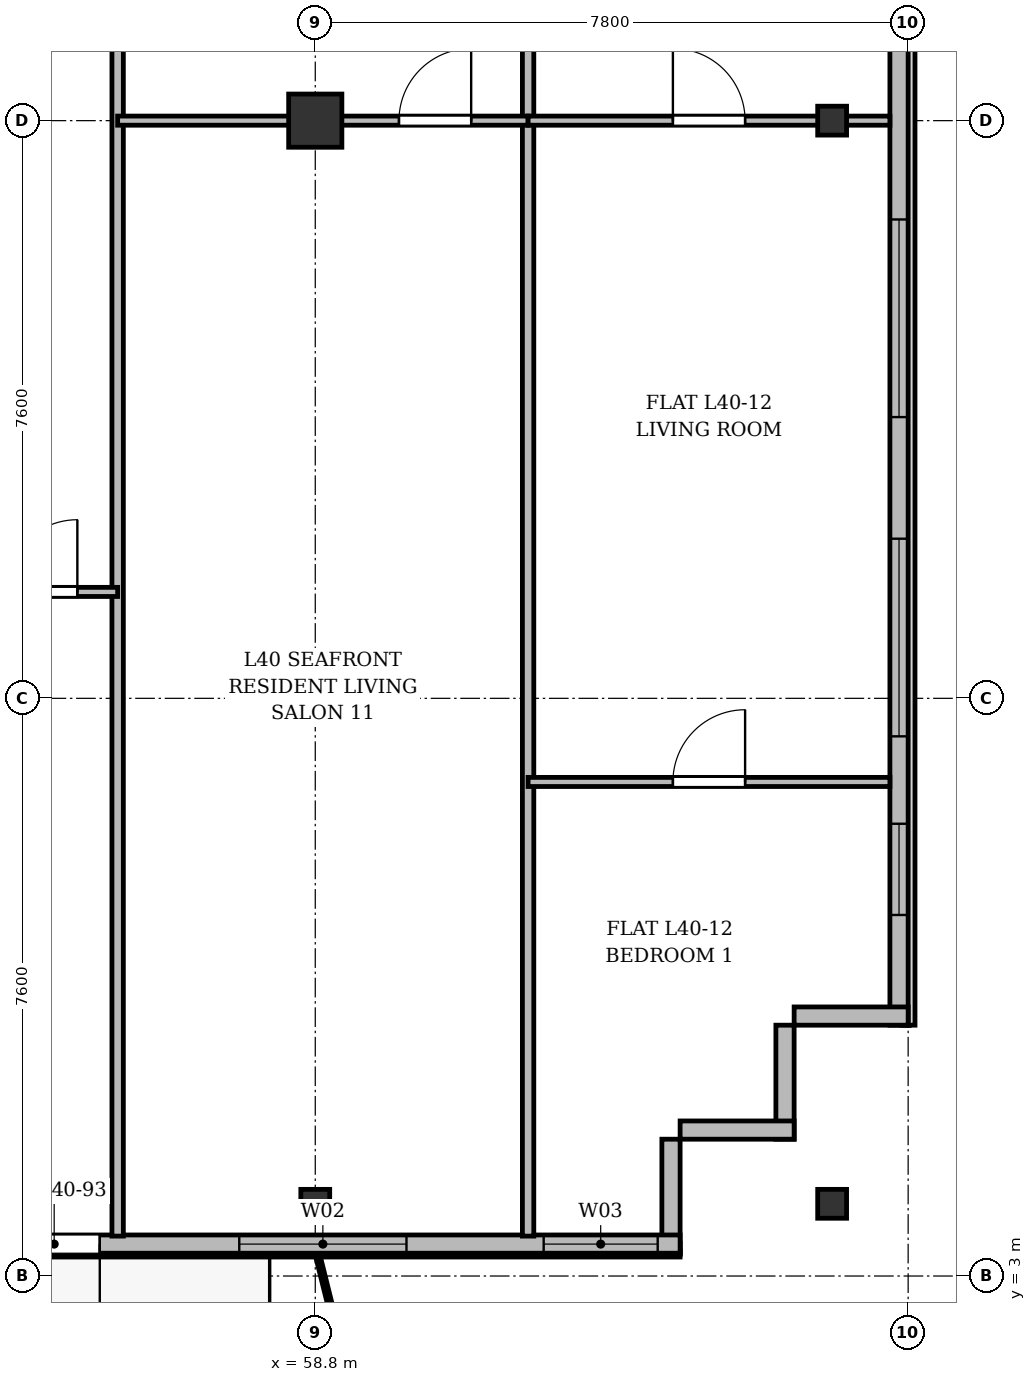
"""IFC4 building model, lengths in metres.
Left out: names, types, materials, properties, quantities, classifications, styles, units other than length and angle.
Written with IfcOpenShell. Run it as: python <this file> out.ifc"""

import sys

from ifc_helpers import new_model, si_unit, direction, frame, frame_2d, origin, origin_2d, place, context, subcontext, project, spatial, rectangle, i_section, extrude, source, transform, mapped, element, fill, save


model = new_model("IFC4")
c1 = context("Model", 3, precision=1e-05, world=origin(), true_north=direction((0.0, 1.0)))
c2 = subcontext(c1, "Body", "Model", "MODEL_VIEW")
j1 = project(units=[si_unit("LENGTHUNIT", "METRE"), si_unit("PLANEANGLEUNIT", "RADIAN")], contexts=[c1])
p1 = place(None, origin())
s1 = spatial("IfcSite", under=j1, at=p1, CompositionType="ELEMENT")
p2 = place(p1, origin())
s2 = spatial("IfcBuilding", under=s1, at=p2, CompositionType="ELEMENT")
p3 = place(p2, frame((0.0, 0.0, 153.7)))
s3 = spatial("IfcBuildingStorey", under=s2, at=p3, CompositionType="ELEMENT", Elevation=153.7)
m1 = source(origin(), c2, "Body", "SweptSolid", [
    extrude(i_section(OverallWidth=0.38, OverallDepth=0.38, WebThickness=0.02, FlangeThickness=0.03, at=origin_2d()), origin(), (0.0, 0.0, 1.0), 3.6),
])
p4 = place(p3, frame((58.8, 3.95, 0.0), z_axis=(0.0, 0.0, 1.0), x_axis=(1.0, 0.0, 0.0)))
e1 = element("IfcColumn", 1, at=p4, inside=s3, PredefinedType="COLUMN", context=c2, shape_type="MappedRepresentation", body=[
    mapped(m1, transform((0.0, 0.0, 0.0), x_axis=(1.0, 0.0, 0.0), y_axis=(0.0, 1.0, 0.0), z_axis=(0.0, 0.0, 1.0), scale=1.0)),
])
m2 = source(origin(), c2, "Body", "SweptSolid", [
    extrude(rectangle(XDim=0.7, YDim=0.7, at=origin_2d()), origin(), (0.0, 0.0, 1.0), 3.6),
])
p5 = place(p3, frame((58.8, 18.2, 0.0), z_axis=(0.0, 0.0, 1.0), x_axis=(1.0, 0.0, 0.0)))
e2 = element("IfcColumn", 2, at=p5, inside=s3, PredefinedType="COLUMN", context=c2, shape_type="MappedRepresentation", body=[
    mapped(m2, transform((0.0, 0.0, 0.0), x_axis=(1.0, 0.0, 0.0), y_axis=(0.0, 1.0, 0.0), z_axis=(0.0, 0.0, 1.0), scale=1.0)),
])
for number, where, z_axis, x_axis in (
    (3, (65.6, 3.95, 0.0), (0.0, 0.0, 1.0), (1.0, 0.0, 0.0)),
    (4, (65.6, 18.2, 0.0), (0.0, 0.0, 1.0), (1.0, 0.0, 0.0)),
):
    element("IfcColumn", number, at=place(p3, frame(where, z_axis=z_axis, x_axis=x_axis)), inside=s3, PredefinedType="COLUMN", context=c2, shape_type="MappedRepresentation", body=[
        mapped(m1, transform((0.0, 0.0, 0.0), x_axis=(1.0, 0.0, 0.0), y_axis=(0.0, 1.0, 0.0), z_axis=(0.0, 0.0, 1.0), scale=1.0)),
    ])
p6 = place(p3, frame((66.48, 45.5, 0.0), z_axis=(0.0, 0.0, 1.0), x_axis=(0.0, -1.0, 0.0)))
e5 = element("IfcWall", 5, at=p6, inside=s3, PredefinedType="SOLIDWALL", context=c2, shape_type="SweptSolid", body=[
    extrude(rectangle(XDim=39.2, YDim=0.24, at=frame_2d((19.6, 0.0))), origin(), (0.0, 0.0, 1.0), 3.35),
])
p7 = place(p6, frame((36.55, 0.0, 0.92)))
e6 = element("IfcOpeningElement", 6, at=p7, cuts=e5, PredefinedType="OPENING", context=c2, shape_type="SweptSolid", body=[
    extrude(rectangle(XDim=1.2, YDim=1.65, at=frame_2d((0.6, 0.825))), frame((0.0, 0.13, 0.0), z_axis=(0.0, -1.0, 0.0), x_axis=(1.0, 0.0, 0.0)), (0.0, 0.0, 1.0), 0.26),
])
p8 = place(p6, frame((32.8, 0.0, 0.92)))
e7 = element("IfcOpeningElement", 7, at=p8, cuts=e5, PredefinedType="OPENING", context=c2, shape_type="SweptSolid", body=[
    extrude(rectangle(XDim=2.6, YDim=1.9, at=frame_2d((1.3, 0.95))), frame((0.0, 0.13, 0.0), z_axis=(0.0, -1.0, 0.0), x_axis=(1.0, 0.0, 0.0)), (0.0, 0.0, 1.0), 0.26),
])
p9 = place(p6, frame((28.6, 0.0, 0.92)))
e8 = element("IfcOpeningElement", 8, at=p9, cuts=e5, PredefinedType="OPENING", context=c2, shape_type="SweptSolid", body=[
    extrude(rectangle(XDim=2.6, YDim=1.9, at=frame_2d((1.3, 0.95))), frame((0.0, 0.13, 0.0), z_axis=(0.0, -1.0, 0.0), x_axis=(1.0, 0.0, 0.0)), (0.0, 0.0, 1.0), 0.26),
])
p10 = place(p6, frame((21.4, 0.0, 0.92)))
e9 = element("IfcOpeningElement", 9, at=p10, cuts=e5, PredefinedType="OPENING", context=c2, shape_type="SweptSolid", body=[
    extrude(rectangle(XDim=2.6, YDim=1.9, at=frame_2d((1.3, 0.95))), frame((0.0, 0.13, 0.0), z_axis=(0.0, -1.0, 0.0), x_axis=(1.0, 0.0, 0.0)), (0.0, 0.0, 1.0), 0.26),
])
p11 = place(p6, frame((7.4, 0.0, 0.92)))
e10 = element("IfcOpeningElement", 10, at=p11, cuts=e5, PredefinedType="OPENING", context=c2, shape_type="SweptSolid", body=[
    extrude(rectangle(XDim=2.6, YDim=1.9, at=frame_2d((1.3, 0.95))), frame((0.0, 0.13, 0.0), z_axis=(0.0, -1.0, 0.0), x_axis=(1.0, 0.0, 0.0)), (0.0, 0.0, 1.0), 0.26),
])
p12 = place(p6, frame((4.5, 0.0, 0.92)))
e11 = element("IfcOpeningElement", 11, at=p12, cuts=e5, PredefinedType="OPENING", context=c2, shape_type="SweptSolid", body=[
    extrude(rectangle(XDim=1.2, YDim=1.65, at=frame_2d((0.6, 0.825))), frame((0.0, 0.13, 0.0), z_axis=(0.0, -1.0, 0.0), x_axis=(1.0, 0.0, 0.0)), (0.0, 0.0, 1.0), 0.26),
])
p13 = place(p6, frame((1.15, 0.0, 0.92)))
e12 = element("IfcOpeningElement", 12, at=p13, cuts=e5, PredefinedType="OPENING", context=c2, shape_type="SweptSolid", body=[
    extrude(rectangle(XDim=1.2, YDim=1.65, at=frame_2d((0.6, 0.825))), frame((0.0, 0.13, 0.0), z_axis=(0.0, -1.0, 0.0), x_axis=(1.0, 0.0, 0.0)), (0.0, 0.0, 1.0), 0.26),
])
p14 = place(p3, frame((66.6, 6.42, 0.0), z_axis=(0.0, 0.0, 1.0), x_axis=(-1.0, 0.0, 0.0)))
e13 = element("IfcWall", 13, at=p14, inside=s3, PredefinedType="SOLIDWALL", context=c2, shape_type="SweptSolid", body=[
    extrude(rectangle(XDim=1.5, YDim=0.24, at=frame_2d((0.75, 0.0))), origin(), (0.0, 0.0, 1.0), 2.85),
])
for number, where, z_axis, x_axis in (
    (14, (64.98, 6.3, 0.0), (0.0, 0.0, 1.0), (0.0, -1.0, 0.0)),
    (15, (65.1, 4.92, 0.0), (0.0, 0.0, 1.0), (-1.0, 0.0, 0.0)),
):
    element("IfcWall", number, at=place(p3, frame(where, z_axis=z_axis, x_axis=x_axis)), inside=s3, PredefinedType="SOLIDWALL", context=c2, shape_type="SweptSolid", body=[
        extrude(rectangle(XDim=1.5, YDim=0.24, at=frame_2d((0.75, 0.0))), origin(), (0.0, 0.0, 1.0), 3.35),
    ])
p15 = place(p3, frame((63.48, 4.8, 0.0), z_axis=(0.0, 0.0, 1.0), x_axis=(0.0, -1.0, 0.0)))
e16 = element("IfcWall", 16, at=p15, inside=s3, PredefinedType="SOLIDWALL", context=c2, shape_type="SweptSolid", body=[
    extrude(rectangle(XDim=1.5, YDim=0.24, at=frame_2d((0.75, 0.0))), origin(), (0.0, 0.0, 1.0), 2.75),
])
p16 = place(p3, frame((63.6, 3.42, 0.0), z_axis=(0.0, 0.0, 1.0), x_axis=(-1.0, 0.0, 0.0)))
e17 = element("IfcWall", 17, at=p16, inside=s3, PredefinedType="SOLIDWALL", context=c2, shape_type="SweptSolid", body=[
    extrude(rectangle(XDim=52.8, YDim=0.24, at=frame_2d((26.4, 0.0))), origin(), (0.0, 0.0, 1.0), 3.35),
])
p17 = place(p16, frame((0.295, 0.0, 0.9)))
e18 = element("IfcOpeningElement", 18, at=p17, cuts=e17, PredefinedType="OPENING", context=c2, shape_type="SweptSolid", body=[
    extrude(rectangle(XDim=1.5, YDim=1.75, at=frame_2d((0.75, 0.875))), frame((0.0, 0.13, 0.0), z_axis=(0.0, -1.0, 0.0), x_axis=(1.0, 0.0, 0.0)), (0.0, 0.0, 1.0), 0.26),
])
p18 = place(p16, frame((3.6, 0.0, 0.9)))
e19 = element("IfcOpeningElement", 19, at=p18, cuts=e17, PredefinedType="OPENING", context=c2, shape_type="SweptSolid", body=[
    extrude(rectangle(XDim=2.2, YDim=1.8, at=frame_2d((1.1, 0.9))), frame((0.0, 0.13, 0.0), z_axis=(0.0, -1.0, 0.0), x_axis=(1.0, 0.0, 0.0)), (0.0, 0.0, 1.0), 0.26),
])
p19 = place(p16, frame((7.635, 0.0, 0.0)))
e20 = element("IfcOpeningElement", 20, at=p19, cuts=e17, PredefinedType="OPENING", context=c2, shape_type="SweptSolid", body=[
    extrude(rectangle(XDim=1.2, YDim=2.2, at=frame_2d((0.6, 1.1))), frame((0.0, 0.13, 0.0), z_axis=(0.0, -1.0, 0.0), x_axis=(1.0, 0.0, 0.0)), (0.0, 0.0, 1.0), 0.26),
])
p20 = place(p16, frame((9.6, 0.0, 0.9)))
e21 = element("IfcOpeningElement", 21, at=p20, cuts=e17, PredefinedType="OPENING", context=c2, shape_type="SweptSolid", body=[
    extrude(rectangle(XDim=2.0, YDim=1.95, at=frame_2d((1.0, 0.975))), frame((0.0, 0.13, 0.0), z_axis=(0.0, -1.0, 0.0), x_axis=(1.0, 0.0, 0.0)), (0.0, 0.0, 1.0), 0.26),
])
p21 = place(p16, frame((12.175, 0.0, 0.9)))
e22 = element("IfcOpeningElement", 22, at=p21, cuts=e17, PredefinedType="OPENING", context=c2, shape_type="SweptSolid", body=[
    extrude(rectangle(XDim=1.65, YDim=1.85, at=frame_2d((0.825, 0.925))), frame((0.0, 0.13, 0.0), z_axis=(0.0, -1.0, 0.0), x_axis=(1.0, 0.0, 0.0)), (0.0, 0.0, 1.0), 0.26),
])
p22 = place(p16, frame((16.1, 0.0, 0.9)))
e23 = element("IfcOpeningElement", 23, at=p22, cuts=e17, PredefinedType="OPENING", context=c2, shape_type="SweptSolid", body=[
    extrude(rectangle(XDim=1.8, YDim=1.8, at=frame_2d((0.9, 0.9))), frame((0.0, 0.13, 0.0), z_axis=(0.0, -1.0, 0.0), x_axis=(1.0, 0.0, 0.0)), (0.0, 0.0, 1.0), 0.26),
])
p23 = place(p16, frame((22.3, 0.0, 0.9)))
e24 = element("IfcOpeningElement", 24, at=p23, cuts=e17, PredefinedType="OPENING", context=c2, shape_type="SweptSolid", body=[
    extrude(rectangle(XDim=2.2, YDim=1.8, at=frame_2d((1.1, 0.9))), frame((0.0, 0.13, 0.0), z_axis=(0.0, -1.0, 0.0), x_axis=(1.0, 0.0, 0.0)), (0.0, 0.0, 1.0), 0.26),
])
p24 = place(p16, frame((27.75, 0.0, 0.9)))
e25 = element("IfcOpeningElement", 25, at=p24, cuts=e17, PredefinedType="OPENING", context=c2, shape_type="SweptSolid", body=[
    extrude(rectangle(XDim=1.5, YDim=1.75, at=frame_2d((0.75, 0.875))), frame((0.0, 0.13, 0.0), z_axis=(0.0, -1.0, 0.0), x_axis=(1.0, 0.0, 0.0)), (0.0, 0.0, 1.0), 0.26),
])
p25 = place(p16, frame((30.5, 0.0, 0.9)))
e26 = element("IfcOpeningElement", 26, at=p25, cuts=e17, PredefinedType="OPENING", context=c2, shape_type="SweptSolid", body=[
    extrude(rectangle(XDim=2.0, YDim=1.95, at=frame_2d((1.0, 0.975))), frame((0.0, 0.13, 0.0), z_axis=(0.0, -1.0, 0.0), x_axis=(1.0, 0.0, 0.0)), (0.0, 0.0, 1.0), 0.26),
])
p26 = place(p16, frame((34.375, 0.0, 0.9)))
e27 = element("IfcOpeningElement", 27, at=p26, cuts=e17, PredefinedType="OPENING", context=c2, shape_type="SweptSolid", body=[
    extrude(rectangle(XDim=1.65, YDim=1.85, at=frame_2d((0.825, 0.925))), frame((0.0, 0.13, 0.0), z_axis=(0.0, -1.0, 0.0), x_axis=(1.0, 0.0, 0.0)), (0.0, 0.0, 1.0), 0.26),
])
p27 = place(p16, frame((39.5, 0.0, 0.9)))
e28 = element("IfcOpeningElement", 28, at=p27, cuts=e17, PredefinedType="OPENING", context=c2, shape_type="SweptSolid", body=[
    extrude(rectangle(XDim=1.8, YDim=1.8, at=frame_2d((0.9, 0.9))), frame((0.0, 0.13, 0.0), z_axis=(0.0, -1.0, 0.0), x_axis=(1.0, 0.0, 0.0)), (0.0, 0.0, 1.0), 0.26),
])
p28 = place(p16, frame((43.65, 0.0, 0.9)))
e29 = element("IfcOpeningElement", 29, at=p28, cuts=e17, PredefinedType="OPENING", context=c2, shape_type="SweptSolid", body=[
    extrude(rectangle(XDim=1.5, YDim=1.75, at=frame_2d((0.75, 0.875))), frame((0.0, 0.13, 0.0), z_axis=(0.0, -1.0, 0.0), x_axis=(1.0, 0.0, 0.0)), (0.0, 0.0, 1.0), 0.26),
])
p29 = place(p16, frame((47.35, 0.0, 0.9)))
e30 = element("IfcOpeningElement", 30, at=p29, cuts=e17, PredefinedType="OPENING", context=c2, shape_type="SweptSolid", body=[
    extrude(rectangle(XDim=1.5, YDim=1.75, at=frame_2d((0.75, 0.875))), frame((0.0, 0.13, 0.0), z_axis=(0.0, -1.0, 0.0), x_axis=(1.0, 0.0, 0.0)), (0.0, 0.0, 1.0), 0.26),
])
p30 = place(p16, frame((51.005, 0.0, 0.9)))
e31 = element("IfcOpeningElement", 31, at=p30, cuts=e17, PredefinedType="OPENING", context=c2, shape_type="SweptSolid", body=[
    extrude(rectangle(XDim=1.5, YDim=1.75, at=frame_2d((0.75, 0.875))), frame((0.0, 0.13, 0.0), z_axis=(0.0, -1.0, 0.0), x_axis=(1.0, 0.0, 0.0)), (0.0, 0.0, 1.0), 0.26),
])
p31 = place(p16, frame((37.85, 0.0, 0.0)))
e32 = element("IfcOpeningElement", 32, at=p31, cuts=e17, PredefinedType="OPENING", context=c2, shape_type="SweptSolid", body=[
    extrude(rectangle(XDim=1.2, YDim=2.2, at=frame_2d((0.6, 1.1))), frame((0.0, 0.13, 0.0), z_axis=(0.0, -1.0, 0.0), x_axis=(1.0, 0.0, 0.0)), (0.0, 0.0, 1.0), 0.26),
])
for number, where, z_axis, x_axis in (
    (33, (61.6, 3.525, 0.0), (0.0, 0.0, 1.0), (0.0, 1.0, 0.0)),
    (34, (56.2, 3.525, 0.0), (0.0, 0.0, 1.0), (0.0, 1.0, 0.0)),
):
    element("IfcWall", number, at=place(p3, frame(where, z_axis=z_axis, x_axis=x_axis)), inside=s3, PredefinedType="PARTITIONING", context=c2, shape_type="SweptSolid", body=[
        extrude(rectangle(XDim=27.275, YDim=0.15, at=frame_2d((13.638, 0.0))), origin(), (0.0, 0.0, 1.0), 2.75),
    ])
p32 = place(p3, frame((54.2, 12.0, 0.0), z_axis=(0.0, 0.0, 1.0), x_axis=(1.0, 0.0, 0.0)))
e35 = element("IfcWall", 35, at=p32, inside=s3, PredefinedType="PARTITIONING", context=c2, shape_type="SweptSolid", body=[
    extrude(rectangle(XDim=2.0, YDim=0.12, at=frame_2d((1.0, 0.0))), origin(), (0.0, 0.0, 1.0), 3.35),
])
p33 = place(p32, frame((0.52, 0.0, 0.0)))
e36 = element("IfcOpeningElement", 36, at=p33, cuts=e35, PredefinedType="OPENING", context=c2, shape_type="SweptSolid", body=[
    extrude(rectangle(XDim=0.95, YDim=2.15, at=frame_2d((0.475, 1.075))), frame((0.0, 0.07, 0.0), z_axis=(0.0, -1.0, 0.0), x_axis=(1.0, 0.0, 0.0)), (0.0, 0.0, 1.0), 0.14),
])
p34 = place(p3, frame((56.2, 18.2, 0.0), z_axis=(0.0, 0.0, 1.0), x_axis=(1.0, 0.0, 0.0)))
e37 = element("IfcWall", 37, at=p34, inside=s3, PredefinedType="PARTITIONING", context=c2, shape_type="SweptSolid", body=[
    extrude(rectangle(XDim=5.4, YDim=0.12, at=frame_2d((2.7, 0.0))), origin(), (0.0, 0.0, 1.0), 2.75),
])
p35 = place(p34, frame((3.701, 0.0, 0.0)))
e38 = element("IfcOpeningElement", 38, at=p35, cuts=e37, PredefinedType="OPENING", context=c2, shape_type="SweptSolid", body=[
    extrude(rectangle(XDim=0.95, YDim=2.15, at=frame_2d((0.475, 1.075))), frame((0.0, 0.07, 0.0), z_axis=(0.0, -1.0, 0.0), x_axis=(1.0, 0.0, 0.0)), (0.0, 0.0, 1.0), 0.14),
])
p36 = place(p3, frame((61.6, 18.2, 0.0), z_axis=(0.0, 0.0, 1.0), x_axis=(1.0, 0.0, 0.0)))
e39 = element("IfcWall", 39, at=p36, inside=s3, PredefinedType="PARTITIONING", context=c2, shape_type="SweptSolid", body=[
    extrude(rectangle(XDim=4.76, YDim=0.12, at=frame_2d((2.38, 0.0))), origin(), (0.0, 0.0, 1.0), 2.75),
])
p37 = place(p36, frame((1.905, 0.0, 0.0)))
e40 = element("IfcOpeningElement", 40, at=p37, cuts=e39, PredefinedType="OPENING", context=c2, shape_type="SweptSolid", body=[
    extrude(rectangle(XDim=0.95, YDim=2.15, at=frame_2d((0.475, 1.075))), frame((0.0, 0.07, 0.0), z_axis=(0.0, -1.0, 0.0), x_axis=(1.0, 0.0, 0.0)), (0.0, 0.0, 1.0), 0.14),
])
p38 = place(p3, frame((61.6, 9.5, 0.0), z_axis=(0.0, 0.0, 1.0), x_axis=(1.0, 0.0, 0.0)))
e41 = element("IfcWall", 41, at=p38, inside=s3, PredefinedType="PARTITIONING", context=c2, shape_type="SweptSolid", body=[
    extrude(rectangle(XDim=4.76, YDim=0.12, at=frame_2d((2.38, 0.0))), origin(), (0.0, 0.0, 1.0), 2.85),
])
p39 = place(p38, frame((1.905, 0.0, 0.0)))
e42 = element("IfcOpeningElement", 42, at=p39, cuts=e41, PredefinedType="OPENING", context=c2, shape_type="SweptSolid", body=[
    extrude(rectangle(XDim=0.95, YDim=2.15, at=frame_2d((0.475, 1.075))), frame((0.0, 0.07, 0.0), z_axis=(0.0, -1.0, 0.0), x_axis=(1.0, 0.0, 0.0)), (0.0, 0.0, 1.0), 0.14),
])
m3 = source(origin(), c2, "Body", "SweptSolid", [
    extrude(rectangle(XDim=1.2, YDim=1.65, at=frame_2d((0.6, 0.825))), frame((0.0, 0.03, 0.0), z_axis=(0.0, -1.0, 0.0), x_axis=(1.0, 0.0, 0.0)), (0.0, 0.0, 1.0), 0.06),
])
p40 = place(p7, origin())
e43 = element("IfcWindow", 43, at=p40, inside=s3, PartitioningType="SINGLE_PANEL", PredefinedType="WINDOW", context=c2, shape_type="MappedRepresentation", body=[
    mapped(m3, transform((0.0, 0.0, 0.0), x_axis=(1.0, 0.0, 0.0), y_axis=(0.0, 1.0, 0.0), z_axis=(0.0, 0.0, 1.0), scale=1.0)),
])
fill(e6, e43)
m4 = source(origin(), c2, "Body", "SweptSolid", [
    extrude(rectangle(XDim=2.6, YDim=1.9, at=frame_2d((1.3, 0.95))), frame((0.0, 0.03, 0.0), z_axis=(0.0, -1.0, 0.0), x_axis=(1.0, 0.0, 0.0)), (0.0, 0.0, 1.0), 0.06),
])
p41 = place(p8, origin())
e44 = element("IfcWindow", 44, at=p41, inside=s3, PartitioningType="SINGLE_PANEL", PredefinedType="WINDOW", context=c2, shape_type="MappedRepresentation", body=[
    mapped(m4, transform((0.0, 0.0, 0.0), x_axis=(1.0, 0.0, 0.0), y_axis=(0.0, 1.0, 0.0), z_axis=(0.0, 0.0, 1.0), scale=1.0)),
])
fill(e7, e44)
p42 = place(p9, origin())
e45 = element("IfcWindow", 45, at=p42, inside=s3, PartitioningType="SINGLE_PANEL", PredefinedType="WINDOW", context=c2, shape_type="MappedRepresentation", body=[
    mapped(m4, transform((0.0, 0.0, 0.0), x_axis=(1.0, 0.0, 0.0), y_axis=(0.0, 1.0, 0.0), z_axis=(0.0, 0.0, 1.0), scale=1.0)),
])
fill(e8, e45)
m5 = source(origin(), c2, "Body", "SweptSolid", [
    extrude(rectangle(XDim=1.5, YDim=1.75, at=frame_2d((0.75, 0.875))), frame((0.0, 0.03, 0.0), z_axis=(0.0, -1.0, 0.0), x_axis=(1.0, 0.0, 0.0)), (0.0, 0.0, 1.0), 0.06),
])
p43 = place(p17, origin())
e46 = element("IfcWindow", 46, at=p43, inside=s3, PartitioningType="SINGLE_PANEL", PredefinedType="WINDOW", context=c2, shape_type="MappedRepresentation", body=[
    mapped(m5, transform((0.0, 0.0, 0.0), x_axis=(1.0, 0.0, 0.0), y_axis=(0.0, 1.0, 0.0), z_axis=(0.0, 0.0, 1.0), scale=1.0)),
])
fill(e18, e46)
m6 = source(origin(), c2, "Body", "SweptSolid", [
    extrude(rectangle(XDim=2.2, YDim=1.8, at=frame_2d((1.1, 0.9))), frame((0.0, 0.03, 0.0), z_axis=(0.0, -1.0, 0.0), x_axis=(1.0, 0.0, 0.0)), (0.0, 0.0, 1.0), 0.06),
])
p44 = place(p18, origin())
e47 = element("IfcWindow", 47, at=p44, inside=s3, PartitioningType="SINGLE_PANEL", PredefinedType="WINDOW", context=c2, shape_type="MappedRepresentation", body=[
    mapped(m6, transform((0.0, 0.0, 0.0), x_axis=(1.0, 0.0, 0.0), y_axis=(0.0, 1.0, 0.0), z_axis=(0.0, 0.0, 1.0), scale=1.0)),
])
fill(e19, e47)
m7 = source(origin(), c2, "Body", "SweptSolid", [
    extrude(rectangle(XDim=1.2, YDim=2.2, at=frame_2d((0.6, 1.1))), frame((0.0, 0.025, 0.0), z_axis=(0.0, -1.0, 0.0), x_axis=(1.0, 0.0, 0.0)), (0.0, 0.0, 1.0), 0.05),
])
p45 = place(p19, origin())
e48 = element("IfcDoor", 48, at=p45, inside=s3, OperationType="SINGLE_SWING_LEFT", PredefinedType="DOOR", context=c2, shape_type="MappedRepresentation", body=[
    mapped(m7, transform((0.0, 0.0, 0.0), x_axis=(1.0, 0.0, 0.0), y_axis=(0.0, 1.0, 0.0), z_axis=(0.0, 0.0, 1.0), scale=1.0)),
])
fill(e20, e48)
m8 = source(origin(), c2, "Body", "SweptSolid", [
    extrude(rectangle(XDim=0.95, YDim=2.15, at=frame_2d((0.475, 1.075))), frame((0.0, 0.025, 0.0), z_axis=(0.0, -1.0, 0.0), x_axis=(1.0, 0.0, 0.0)), (0.0, 0.0, 1.0), 0.05),
])
p46 = place(p33, origin())
e49 = element("IfcDoor", 49, at=p46, inside=s3, OperationType="SINGLE_SWING_RIGHT", PredefinedType="DOOR", context=c2, shape_type="MappedRepresentation", body=[
    mapped(m8, transform((0.0, 0.0, 0.0), x_axis=(1.0, 0.0, 0.0), y_axis=(0.0, 1.0, 0.0), z_axis=(0.0, 0.0, 1.0), scale=1.0)),
])
fill(e36, e49)
p47 = place(p35, origin())
e50 = element("IfcDoor", 50, at=p47, inside=s3, OperationType="SINGLE_SWING_RIGHT", PredefinedType="DOOR", context=c2, shape_type="MappedRepresentation", body=[
    mapped(m8, transform((0.0, 0.0, 0.0), x_axis=(1.0, 0.0, 0.0), y_axis=(0.0, 1.0, 0.0), z_axis=(0.0, 0.0, 1.0), scale=1.0)),
])
fill(e38, e50)
p48 = place(p37, origin())
e51 = element("IfcDoor", 51, at=p48, inside=s3, OperationType="SINGLE_SWING_LEFT", PredefinedType="DOOR", context=c2, shape_type="MappedRepresentation", body=[
    mapped(m8, transform((0.0, 0.0, 0.0), x_axis=(1.0, 0.0, 0.0), y_axis=(0.0, 1.0, 0.0), z_axis=(0.0, 0.0, 1.0), scale=1.0)),
])
fill(e40, e51)
p49 = place(p39, origin())
e52 = element("IfcDoor", 52, at=p49, inside=s3, OperationType="SINGLE_SWING_RIGHT", PredefinedType="DOOR", context=c2, shape_type="MappedRepresentation", body=[
    mapped(m8, transform((0.0, 0.0, 0.0), x_axis=(1.0, 0.0, 0.0), y_axis=(0.0, 1.0, 0.0), z_axis=(0.0, 0.0, 1.0), scale=1.0)),
])
fill(e42, e52)
save(model, sys.argv[1])
